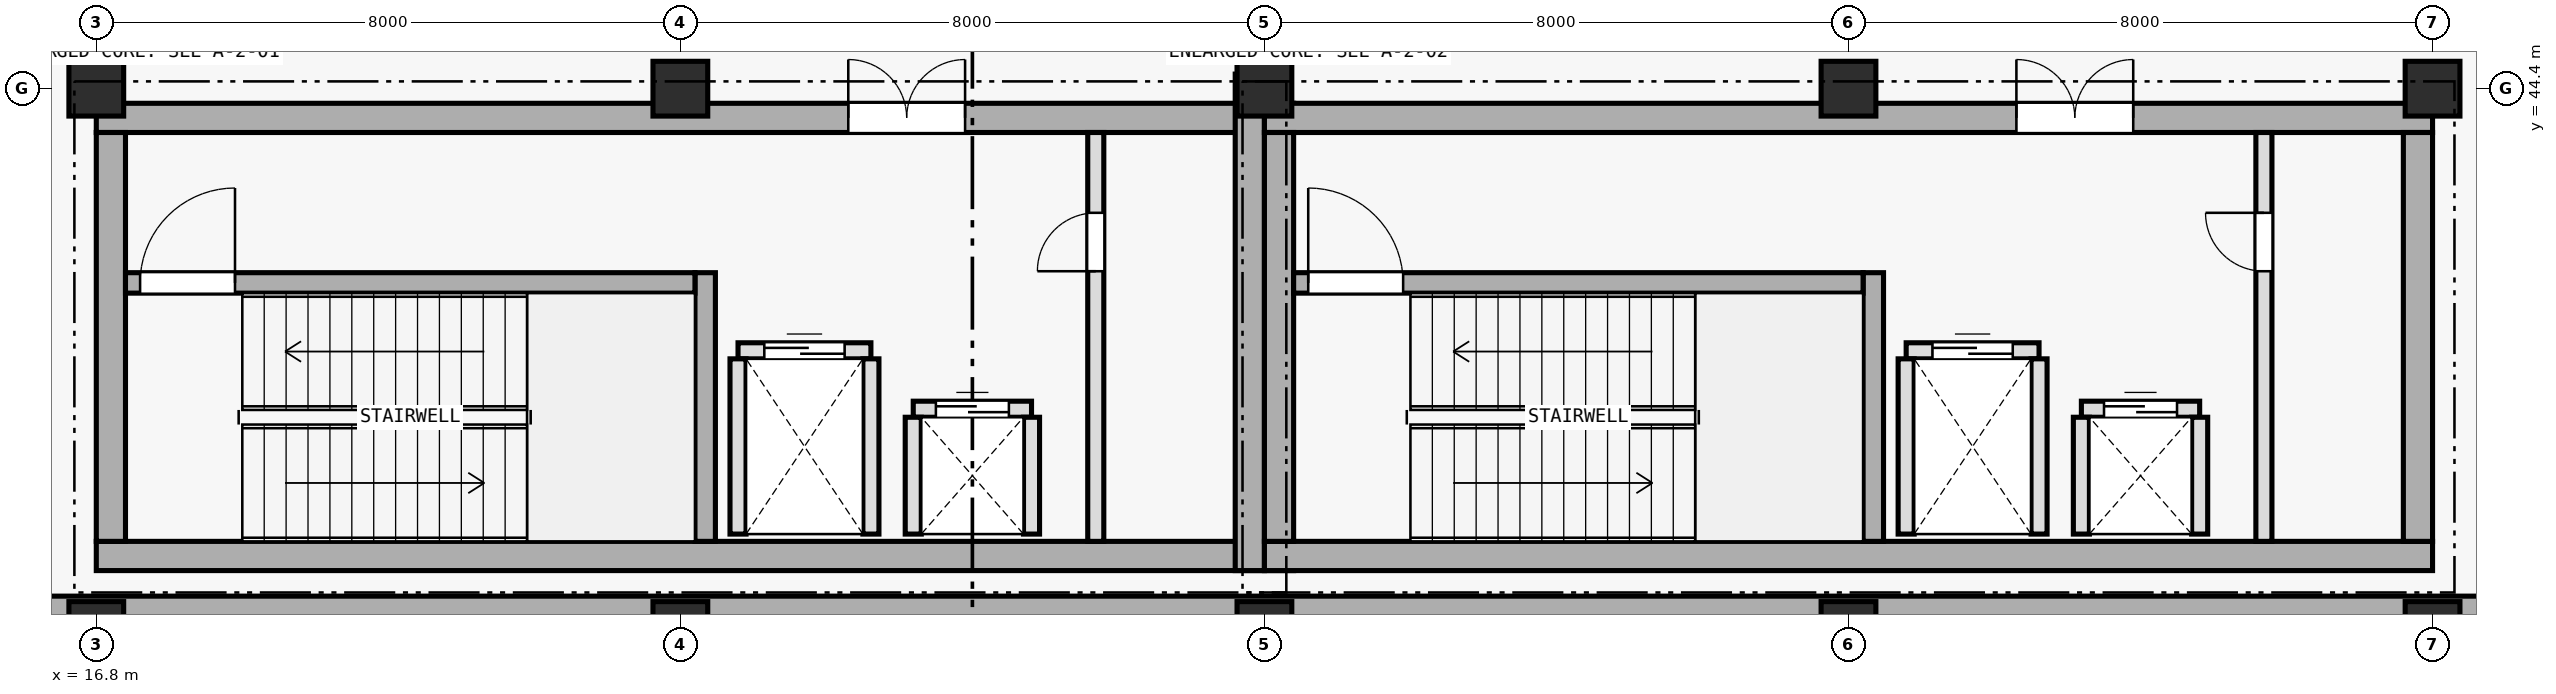
"""IFC4 building model, lengths in metres.
Left out: names, types, materials, properties, quantities, classifications, styles, units other than length and angle.
Written with IfcOpenShell. Run it as: python <this file> out.ifc"""

import sys

from ifc_helpers import new_model, si_unit, direction, frame, frame_2d, origin, origin_2d, place, context, subcontext, project, spatial, rectangle, extrude, element, fill, save


model = new_model("IFC4")
c1 = context("Model", 3, precision=1e-05, world=origin(), true_north=direction((0.0, 1.0)))
c2 = subcontext(c1, "Body", "Model", "MODEL_VIEW")
j1 = project(units=[si_unit("LENGTHUNIT", "METRE"), si_unit("PLANEANGLEUNIT", "RADIAN")], contexts=[c1])
p1 = place(None, origin())
s1 = spatial("IfcSite", under=j1, at=p1, CompositionType="ELEMENT")
p2 = place(p1, origin())
s2 = spatial("IfcBuilding", under=s1, at=p2, CompositionType="ELEMENT")
p3 = place(p2, frame((0.0, 0.0, -4.8)))
s3 = spatial("IfcBuildingStorey", under=s2, at=p3, CompositionType="ELEMENT", Elevation=-4.8)
p4 = place(p3, frame((16.8, 38.0, 0.0), z_axis=(0.0, 0.0, 1.0), x_axis=(1.0, 0.0, 0.0)))
e1 = element("IfcWall", 1, at=p4, inside=s3, PredefinedType="SHEAR", context=c2, shape_type="SweptSolid", body=[
    extrude(rectangle(XDim=16.4, YDim=0.4, at=frame_2d((8.2, 0.0))), origin(), (0.0, 0.0, 1.0), 4.795),
])
p5 = place(p3, frame((16.8, 44.0, 0.0), z_axis=(0.0, 0.0, 1.0), x_axis=(1.0, 0.0, 0.0)))
e2 = element("IfcWall", 2, at=p5, inside=s3, PredefinedType="SHEAR", context=c2, shape_type="SweptSolid", body=[
    extrude(rectangle(XDim=16.4, YDim=0.4, at=frame_2d((8.2, 0.0))), origin(), (0.0, 0.0, 1.0), 4.795),
])
p6 = place(p5, frame((10.3, 0.0, 0.0)))
e3 = element("IfcOpeningElement", 3, at=p6, cuts=e2, PredefinedType="OPENING", context=c2, shape_type="SweptSolid", body=[
    extrude(rectangle(XDim=1.6, YDim=2.2, at=frame_2d((0.8, 1.1))), frame((0.0, 0.21, 0.0), z_axis=(0.0, -1.0, 0.0), x_axis=(1.0, 0.0, 0.0)), (0.0, 0.0, 1.0), 0.42),
])
p7 = place(p3, frame((17.0, 38.2, 0.0), z_axis=(0.0, 0.0, 1.0), x_axis=(0.0, 1.0, 0.0)))
e4 = element("IfcWall", 4, at=p7, inside=s3, PredefinedType="SHEAR", context=c2, shape_type="SweptSolid", body=[
    extrude(rectangle(XDim=5.6, YDim=0.4, at=frame_2d((2.8, 0.0))), origin(), (0.0, 0.0, 1.0), 4.795),
])
p8 = place(p3, frame((32.6, 37.8, 0.0), z_axis=(0.0, 0.0, 1.0), x_axis=(0.0, 1.0, 0.0)))
e5 = element("IfcWall", 5, at=p8, inside=s3, PredefinedType="SHEAR", context=c2, shape_type="SweptSolid", body=[
    extrude(rectangle(XDim=6.8, YDim=0.4, at=frame_2d((3.4, 0.0))), origin(), (0.0, 0.0, 1.0), 4.795),
])
p9 = place(p3, frame((25.14, 38.2, 0.0), z_axis=(0.0, 0.0, 1.0), x_axis=(0.0, 1.0, 0.0)))
e6 = element("IfcWall", 6, at=p9, inside=s3, PredefinedType="SHEAR", context=c2, shape_type="SweptSolid", body=[
    extrude(rectangle(XDim=3.68, YDim=0.28, at=frame_2d((1.84, 0.0))), origin(), (0.0, 0.0, 1.0), 4.795),
])
p10 = place(p3, frame((17.2, 41.74, 0.0), z_axis=(0.0, 0.0, 1.0), x_axis=(1.0, 0.0, 0.0)))
e7 = element("IfcWall", 7, at=p10, inside=s3, PredefinedType="SHEAR", context=c2, shape_type="SweptSolid", body=[
    extrude(rectangle(XDim=7.8, YDim=0.28, at=frame_2d((3.9, 0.0))), origin(), (0.0, 0.0, 1.0), 4.795),
])
p11 = place(p10, frame((0.2, 0.0, 0.0)))
e8 = element("IfcOpeningElement", 8, at=p11, cuts=e7, PredefinedType="OPENING", context=c2, shape_type="SweptSolid", body=[
    extrude(rectangle(XDim=1.3, YDim=2.2, at=frame_2d((0.65, 1.1))), frame((0.0, 0.15, 0.0), z_axis=(0.0, -1.0, 0.0), x_axis=(1.0, 0.0, 0.0)), (0.0, 0.0, 1.0), 0.3),
])
p12 = place(p3, frame((32.8, 38.0, 0.0), z_axis=(0.0, 0.0, 1.0), x_axis=(1.0, 0.0, 0.0)))
e9 = element("IfcWall", 9, at=p12, inside=s3, PredefinedType="SHEAR", context=c2, shape_type="SweptSolid", body=[
    extrude(rectangle(XDim=16.0, YDim=0.4, at=frame_2d((8.0, 0.0))), origin(), (0.0, 0.0, 1.0), 4.795),
])
p13 = place(p3, frame((32.8, 44.0, 0.0), z_axis=(0.0, 0.0, 1.0), x_axis=(1.0, 0.0, 0.0)))
e10 = element("IfcWall", 10, at=p13, inside=s3, PredefinedType="SHEAR", context=c2, shape_type="SweptSolid", body=[
    extrude(rectangle(XDim=16.0, YDim=0.4, at=frame_2d((8.0, 0.0))), origin(), (0.0, 0.0, 1.0), 4.795),
])
p14 = place(p13, frame((10.3, 0.0, 0.0)))
e11 = element("IfcOpeningElement", 11, at=p14, cuts=e10, PredefinedType="OPENING", context=c2, shape_type="SweptSolid", body=[
    extrude(rectangle(XDim=1.6, YDim=2.2, at=frame_2d((0.8, 1.1))), frame((0.0, 0.21, 0.0), z_axis=(0.0, -1.0, 0.0), x_axis=(1.0, 0.0, 0.0)), (0.0, 0.0, 1.0), 0.42),
])
for number, where, z_axis, x_axis in (
    (12, (33.0, 38.2, 0.0), (0.0, 0.0, 1.0), (0.0, 1.0, 0.0)),
    (13, (48.6, 38.2, 0.0), (0.0, 0.0, 1.0), (0.0, 1.0, 0.0)),
):
    element("IfcWall", number, at=place(p3, frame(where, z_axis=z_axis, x_axis=x_axis)), inside=s3, PredefinedType="SHEAR", context=c2, shape_type="SweptSolid", body=[
        extrude(rectangle(XDim=5.6, YDim=0.4, at=frame_2d((2.8, 0.0))), origin(), (0.0, 0.0, 1.0), 4.795),
    ])
p15 = place(p3, frame((41.14, 38.2, 0.0), z_axis=(0.0, 0.0, 1.0), x_axis=(0.0, 1.0, 0.0)))
e14 = element("IfcWall", 14, at=p15, inside=s3, PredefinedType="SHEAR", context=c2, shape_type="SweptSolid", body=[
    extrude(rectangle(XDim=3.68, YDim=0.28, at=frame_2d((1.84, 0.0))), origin(), (0.0, 0.0, 1.0), 4.795),
])
p16 = place(p3, frame((33.2, 41.74, 0.0), z_axis=(0.0, 0.0, 1.0), x_axis=(1.0, 0.0, 0.0)))
e15 = element("IfcWall", 15, at=p16, inside=s3, PredefinedType="SHEAR", context=c2, shape_type="SweptSolid", body=[
    extrude(rectangle(XDim=7.8, YDim=0.28, at=frame_2d((3.9, 0.0))), origin(), (0.0, 0.0, 1.0), 4.795),
])
p17 = place(p16, frame((0.2, 0.0, 0.0)))
e16 = element("IfcOpeningElement", 16, at=p17, cuts=e15, PredefinedType="OPENING", context=c2, shape_type="SweptSolid", body=[
    extrude(rectangle(XDim=1.3, YDim=2.2, at=frame_2d((0.65, 1.1))), frame((0.0, 0.15, 0.0), z_axis=(0.0, -1.0, 0.0), x_axis=(1.0, 0.0, 0.0)), (0.0, 0.0, 1.0), 0.3),
])
p18 = place(p3, frame((104.8, 37.225, 0.0), z_axis=(0.0, 0.0, 1.0), x_axis=(-1.0, 0.0, 0.0)))
e17 = element("IfcWall", 17, at=p18, inside=s3, PredefinedType="SOLIDWALL", context=c2, shape_type="SweptSolid", body=[
    extrude(rectangle(XDim=96.0, YDim=0.45, at=frame_2d((48.0, 0.0))), origin(), (0.0, 0.0, 1.0), 4.38),
])
for number, where, z_axis, x_axis in (
    (18, (16.8, 37.0, 0.0), (0.0, 0.0, 1.0), (1.0, 0.0, 0.0)),
    (19, (16.8, 44.4, 0.0), (0.0, 0.0, 1.0), (1.0, 0.0, 0.0)),
    (20, (24.8, 37.0, 0.0), (0.0, 0.0, 1.0), (1.0, 0.0, 0.0)),
    (21, (24.8, 44.4, 0.0), (0.0, 0.0, 1.0), (1.0, 0.0, 0.0)),
    (22, (32.8, 37.0, 0.0), (0.0, 0.0, 1.0), (1.0, 0.0, 0.0)),
    (23, (32.8, 44.4, 0.0), (0.0, 0.0, 1.0), (1.0, 0.0, 0.0)),
    (24, (40.8, 37.0, 0.0), (0.0, 0.0, 1.0), (1.0, 0.0, 0.0)),
    (25, (40.8, 44.4, 0.0), (0.0, 0.0, 1.0), (1.0, 0.0, 0.0)),
    (26, (48.8, 37.0, 0.0), (0.0, 0.0, 1.0), (1.0, 0.0, 0.0)),
    (27, (48.8, 44.4, 0.0), (0.0, 0.0, 1.0), (1.0, 0.0, 0.0)),
):
    element("IfcColumn", number, at=place(p3, frame(where, z_axis=z_axis, x_axis=x_axis)), inside=s3, PredefinedType="COLUMN", context=c2, shape_type="SweptSolid", body=[
        extrude(rectangle(XDim=0.75, YDim=0.75, at=origin_2d()), origin(), (0.0, 0.0, 1.0), 4.8),
    ])
p19 = place(p3, frame((25.59, 40.81, 0.0), z_axis=(0.0, 0.0, 1.0), x_axis=(1.0, 0.0, 0.0)))
e28 = element("IfcWall", 28, at=p19, inside=s3, PredefinedType="PLUMBINGWALL", context=c2, shape_type="SweptSolid", body=[
    extrude(rectangle(XDim=1.82, YDim=0.22, at=frame_2d((0.91, 0.0))), origin(), (0.0, 0.0, 1.0), 4.38),
])
p20 = place(p19, frame((0.36, 0.0, 0.0)))
e29 = element("IfcOpeningElement", 29, at=p20, cuts=e28, PredefinedType="OPENING", context=c2, shape_type="SweptSolid", body=[
    extrude(rectangle(XDim=1.1, YDim=2.2, at=frame_2d((0.55, 1.1))), frame((0.0, 0.12, 0.0), z_axis=(0.0, -1.0, 0.0), x_axis=(1.0, 0.0, 0.0)), (0.0, 0.0, 1.0), 0.24),
])
for number, where, z_axis, x_axis in (
    (30, (25.59, 38.3, 0.0), (0.0, 0.0, 1.0), (0.0, 1.0, 0.0)),
    (31, (27.41, 38.3, 0.0), (0.0, 0.0, 1.0), (0.0, 1.0, 0.0)),
):
    element("IfcWall", number, at=place(p3, frame(where, z_axis=z_axis, x_axis=x_axis)), inside=s3, PredefinedType="PLUMBINGWALL", context=c2, shape_type="SweptSolid", body=[
        extrude(rectangle(XDim=2.4, YDim=0.22, at=frame_2d((1.2, 0.0))), origin(), (0.0, 0.0, 1.0), 4.38),
    ])
p21 = place(p3, frame((27.99, 40.01, 0.0), z_axis=(0.0, 0.0, 1.0), x_axis=(1.0, 0.0, 0.0)))
e32 = element("IfcWall", 32, at=p21, inside=s3, PredefinedType="PLUMBINGWALL", context=c2, shape_type="SweptSolid", body=[
    extrude(rectangle(XDim=1.62, YDim=0.22, at=frame_2d((0.81, 0.0))), origin(), (0.0, 0.0, 1.0), 4.38),
])
p22 = place(p21, frame((0.31, 0.0, 0.0)))
e33 = element("IfcOpeningElement", 33, at=p22, cuts=e32, PredefinedType="OPENING", context=c2, shape_type="SweptSolid", body=[
    extrude(rectangle(XDim=1.0, YDim=2.2, at=frame_2d((0.5, 1.1))), frame((0.0, 0.12, 0.0), z_axis=(0.0, -1.0, 0.0), x_axis=(1.0, 0.0, 0.0)), (0.0, 0.0, 1.0), 0.24),
])
for number, where, z_axis, x_axis in (
    (34, (27.99, 38.3, 0.0), (0.0, 0.0, 1.0), (0.0, 1.0, 0.0)),
    (35, (29.61, 38.3, 0.0), (0.0, 0.0, 1.0), (0.0, 1.0, 0.0)),
):
    element("IfcWall", number, at=place(p3, frame(where, z_axis=z_axis, x_axis=x_axis)), inside=s3, PredefinedType="PLUMBINGWALL", context=c2, shape_type="SweptSolid", body=[
        extrude(rectangle(XDim=1.6, YDim=0.22, at=frame_2d((0.8, 0.0))), origin(), (0.0, 0.0, 1.0), 4.38),
    ])
p23 = place(p3, frame((30.49, 38.2, 0.0), z_axis=(0.0, 0.0, 1.0), x_axis=(0.0, 1.0, 0.0)))
e36 = element("IfcWall", 36, at=p23, inside=s3, PredefinedType="PLUMBINGWALL", context=c2, shape_type="SweptSolid", body=[
    extrude(rectangle(XDim=5.6, YDim=0.22, at=frame_2d((2.8, 0.0))), origin(), (0.0, 0.0, 1.0), 4.38),
])
p24 = place(p23, frame((3.7, 0.0, 0.0)))
e37 = element("IfcOpeningElement", 37, at=p24, cuts=e36, PredefinedType="OPENING", context=c2, shape_type="SweptSolid", body=[
    extrude(rectangle(XDim=0.8, YDim=2.1, at=frame_2d((0.4, 1.05))), frame((0.0, 0.12, 0.0), z_axis=(0.0, -1.0, 0.0), x_axis=(1.0, 0.0, 0.0)), (0.0, 0.0, 1.0), 0.24),
])
p25 = place(p3, frame((41.59, 40.81, 0.0), z_axis=(0.0, 0.0, 1.0), x_axis=(1.0, 0.0, 0.0)))
e38 = element("IfcWall", 38, at=p25, inside=s3, PredefinedType="PLUMBINGWALL", context=c2, shape_type="SweptSolid", body=[
    extrude(rectangle(XDim=1.82, YDim=0.22, at=frame_2d((0.91, 0.0))), origin(), (0.0, 0.0, 1.0), 4.38),
])
p26 = place(p25, frame((0.36, 0.0, 0.0)))
e39 = element("IfcOpeningElement", 39, at=p26, cuts=e38, PredefinedType="OPENING", context=c2, shape_type="SweptSolid", body=[
    extrude(rectangle(XDim=1.1, YDim=2.2, at=frame_2d((0.55, 1.1))), frame((0.0, 0.12, 0.0), z_axis=(0.0, -1.0, 0.0), x_axis=(1.0, 0.0, 0.0)), (0.0, 0.0, 1.0), 0.24),
])
for number, where, z_axis, x_axis in (
    (40, (41.59, 38.3, 0.0), (0.0, 0.0, 1.0), (0.0, 1.0, 0.0)),
    (41, (43.41, 38.3, 0.0), (0.0, 0.0, 1.0), (0.0, 1.0, 0.0)),
):
    element("IfcWall", number, at=place(p3, frame(where, z_axis=z_axis, x_axis=x_axis)), inside=s3, PredefinedType="PLUMBINGWALL", context=c2, shape_type="SweptSolid", body=[
        extrude(rectangle(XDim=2.4, YDim=0.22, at=frame_2d((1.2, 0.0))), origin(), (0.0, 0.0, 1.0), 4.38),
    ])
p27 = place(p3, frame((43.99, 40.01, 0.0), z_axis=(0.0, 0.0, 1.0), x_axis=(1.0, 0.0, 0.0)))
e42 = element("IfcWall", 42, at=p27, inside=s3, PredefinedType="PLUMBINGWALL", context=c2, shape_type="SweptSolid", body=[
    extrude(rectangle(XDim=1.62, YDim=0.22, at=frame_2d((0.81, 0.0))), origin(), (0.0, 0.0, 1.0), 4.38),
])
p28 = place(p27, frame((0.31, 0.0, 0.0)))
e43 = element("IfcOpeningElement", 43, at=p28, cuts=e42, PredefinedType="OPENING", context=c2, shape_type="SweptSolid", body=[
    extrude(rectangle(XDim=1.0, YDim=2.2, at=frame_2d((0.5, 1.1))), frame((0.0, 0.12, 0.0), z_axis=(0.0, -1.0, 0.0), x_axis=(1.0, 0.0, 0.0)), (0.0, 0.0, 1.0), 0.24),
])
for number, where, z_axis, x_axis in (
    (44, (43.99, 38.3, 0.0), (0.0, 0.0, 1.0), (0.0, 1.0, 0.0)),
    (45, (45.61, 38.3, 0.0), (0.0, 0.0, 1.0), (0.0, 1.0, 0.0)),
):
    element("IfcWall", number, at=place(p3, frame(where, z_axis=z_axis, x_axis=x_axis)), inside=s3, PredefinedType="PLUMBINGWALL", context=c2, shape_type="SweptSolid", body=[
        extrude(rectangle(XDim=1.6, YDim=0.22, at=frame_2d((0.8, 0.0))), origin(), (0.0, 0.0, 1.0), 4.38),
    ])
p29 = place(p3, frame((46.49, 38.2, 0.0), z_axis=(0.0, 0.0, 1.0), x_axis=(0.0, 1.0, 0.0)))
e46 = element("IfcWall", 46, at=p29, inside=s3, PredefinedType="PLUMBINGWALL", context=c2, shape_type="SweptSolid", body=[
    extrude(rectangle(XDim=5.6, YDim=0.22, at=frame_2d((2.8, 0.0))), origin(), (0.0, 0.0, 1.0), 4.38),
])
p30 = place(p29, frame((3.7, 0.0, 0.0)))
e47 = element("IfcOpeningElement", 47, at=p30, cuts=e46, PredefinedType="OPENING", context=c2, shape_type="SweptSolid", body=[
    extrude(rectangle(XDim=0.8, YDim=2.1, at=frame_2d((0.4, 1.05))), frame((0.0, 0.12, 0.0), z_axis=(0.0, -1.0, 0.0), x_axis=(1.0, 0.0, 0.0)), (0.0, 0.0, 1.0), 0.24),
])
p31 = place(p11, origin())
e48 = element("IfcDoor", 48, at=p31, inside=s3, OperationType="SINGLE_SWING_RIGHT", PredefinedType="DOOR", context=c2, shape_type="SweptSolid", body=[
    extrude(rectangle(XDim=1.3, YDim=2.2, at=frame_2d((0.65, 1.1))), frame((0.0, 0.025, 0.0), z_axis=(0.0, -1.0, 0.0), x_axis=(1.0, 0.0, 0.0)), (0.0, 0.0, 1.0), 0.05),
])
fill(e8, e48)
p32 = place(p20, origin())
e49 = element("IfcDoor", 49, at=p32, inside=s3, OperationType="DOUBLE_DOOR_SLIDING", PredefinedType="DOOR", context=c2, shape_type="SweptSolid", body=[
    extrude(rectangle(XDim=1.1, YDim=2.2, at=frame_2d((0.55, 1.1))), frame((0.0, 0.025, 0.0), z_axis=(0.0, -1.0, 0.0), x_axis=(1.0, 0.0, 0.0)), (0.0, 0.0, 1.0), 0.05),
])
fill(e29, e49)
p33 = place(p22, origin())
e50 = element("IfcDoor", 50, at=p33, inside=s3, OperationType="DOUBLE_DOOR_SLIDING", PredefinedType="DOOR", context=c2, shape_type="SweptSolid", body=[
    extrude(rectangle(XDim=1.0, YDim=2.2, at=frame_2d((0.5, 1.1))), frame((0.0, 0.025, 0.0), z_axis=(0.0, -1.0, 0.0), x_axis=(1.0, 0.0, 0.0)), (0.0, 0.0, 1.0), 0.05),
])
fill(e33, e50)
p34 = place(p24, origin())
e51 = element("IfcDoor", 51, at=p34, inside=s3, OperationType="SINGLE_SWING_LEFT", PredefinedType="DOOR", context=c2, shape_type="SweptSolid", body=[
    extrude(rectangle(XDim=0.8, YDim=2.1, at=frame_2d((0.4, 1.05))), frame((0.0, 0.025, 0.0), z_axis=(0.0, -1.0, 0.0), x_axis=(1.0, 0.0, 0.0)), (0.0, 0.0, 1.0), 0.05),
])
fill(e37, e51)
p35 = place(p6, origin())
e52 = element("IfcDoor", 52, at=p35, inside=s3, OperationType="DOUBLE_DOOR_SINGLE_SWING", PredefinedType="DOOR", context=c2, shape_type="SweptSolid", body=[
    extrude(rectangle(XDim=1.6, YDim=2.2, at=frame_2d((0.8, 1.1))), frame((0.0, 0.025, 0.0), z_axis=(0.0, -1.0, 0.0), x_axis=(1.0, 0.0, 0.0)), (0.0, 0.0, 1.0), 0.05),
])
fill(e3, e52)
p36 = place(p17, origin())
e53 = element("IfcDoor", 53, at=p36, inside=s3, OperationType="SINGLE_SWING_LEFT", PredefinedType="DOOR", context=c2, shape_type="SweptSolid", body=[
    extrude(rectangle(XDim=1.3, YDim=2.2, at=frame_2d((0.65, 1.1))), frame((0.0, 0.025, 0.0), z_axis=(0.0, -1.0, 0.0), x_axis=(1.0, 0.0, 0.0)), (0.0, 0.0, 1.0), 0.05),
])
fill(e16, e53)
p37 = place(p26, origin())
e54 = element("IfcDoor", 54, at=p37, inside=s3, OperationType="DOUBLE_DOOR_SLIDING", PredefinedType="DOOR", context=c2, shape_type="SweptSolid", body=[
    extrude(rectangle(XDim=1.1, YDim=2.2, at=frame_2d((0.55, 1.1))), frame((0.0, 0.025, 0.0), z_axis=(0.0, -1.0, 0.0), x_axis=(1.0, 0.0, 0.0)), (0.0, 0.0, 1.0), 0.05),
])
fill(e39, e54)
p38 = place(p28, origin())
e55 = element("IfcDoor", 55, at=p38, inside=s3, OperationType="DOUBLE_DOOR_SLIDING", PredefinedType="DOOR", context=c2, shape_type="SweptSolid", body=[
    extrude(rectangle(XDim=1.0, YDim=2.2, at=frame_2d((0.5, 1.1))), frame((0.0, 0.025, 0.0), z_axis=(0.0, -1.0, 0.0), x_axis=(1.0, 0.0, 0.0)), (0.0, 0.0, 1.0), 0.05),
])
fill(e43, e55)
p39 = place(p30, origin())
e56 = element("IfcDoor", 56, at=p39, inside=s3, OperationType="SINGLE_SWING_RIGHT", PredefinedType="DOOR", context=c2, shape_type="SweptSolid", body=[
    extrude(rectangle(XDim=0.8, YDim=2.1, at=frame_2d((0.4, 1.05))), frame((0.0, 0.025, 0.0), z_axis=(0.0, -1.0, 0.0), x_axis=(1.0, 0.0, 0.0)), (0.0, 0.0, 1.0), 0.05),
])
fill(e47, e56)
p40 = place(p14, origin())
e57 = element("IfcDoor", 57, at=p40, inside=s3, OperationType="DOUBLE_DOOR_SINGLE_SWING", PredefinedType="DOOR", context=c2, shape_type="SweptSolid", body=[
    extrude(rectangle(XDim=1.6, YDim=2.2, at=frame_2d((0.8, 1.1))), frame((0.0, 0.025, 0.0), z_axis=(0.0, -1.0, 0.0), x_axis=(1.0, 0.0, 0.0)), (0.0, 0.0, 1.0), 0.05),
])
fill(e11, e57)
save(model, sys.argv[1])
